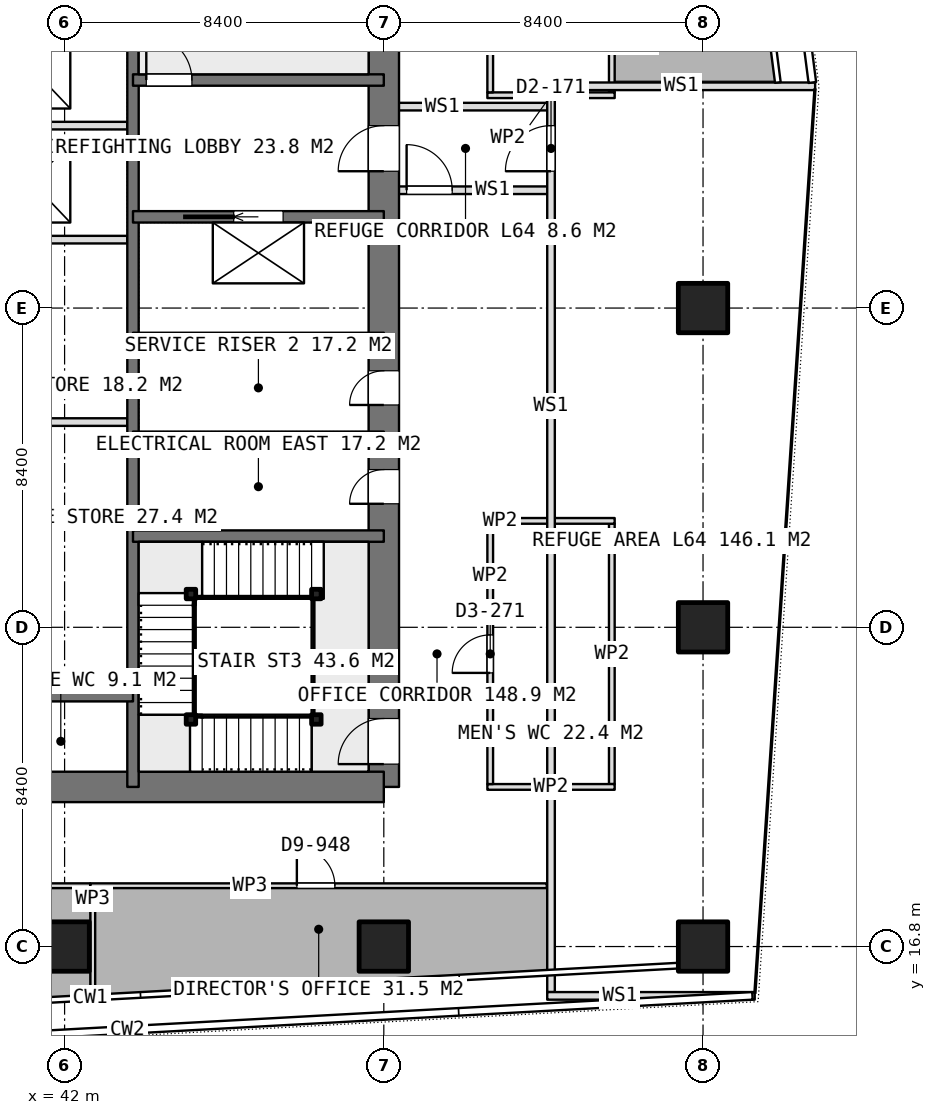
"""IFC4 building model, lengths in metres.
Left out: names, types, materials, properties, quantities, classifications, styles, units other than length and angle.
Written with IfcOpenShell. Run it as: python <this file> out.ifc"""

import sys

from ifc_helpers import new_model, si_unit, direction, frame, frame_2d, origin, origin_2d, place, context, subcontext, project, spatial, rectangle, extrude, element, fill, save


model = new_model("IFC4")
c1 = context("Model", 3, precision=1e-05, world=origin(), true_north=direction((0.0, 1.0)))
c2 = subcontext(c1, "Body", "Model", "MODEL_VIEW")
j1 = project(units=[si_unit("LENGTHUNIT", "METRE"), si_unit("PLANEANGLEUNIT", "RADIAN")], contexts=[c1])
p1 = place(None, origin())
s1 = spatial("IfcSite", under=j1, at=p1, CompositionType="ELEMENT")
p2 = place(p1, origin())
s2 = spatial("IfcBuilding", under=s1, at=p2, CompositionType="ELEMENT")
p3 = place(p2, frame((0.0, 0.0, 253.85)))
s3 = spatial("IfcBuildingStorey", under=s2, at=p3, CompositionType="ELEMENT", Elevation=253.85)
p4 = place(p3, frame((40.0, 21.0, 0.0), z_axis=(0.0, 0.0, 1.0), x_axis=(1.0, 0.0, 0.0)))
e1 = element("IfcWall", 1, at=p4, inside=s3, PredefinedType="SHEAR", context=c2, shape_type="SweptSolid", body=[
    extrude(rectangle(XDim=10.4, YDim=0.8, at=frame_2d((5.2, 0.0))), origin(), (0.0, 0.0, 1.0), 3.75),
])
p5 = place(p3, frame((50.4, 21.0, 0.0), z_axis=(0.0, 0.0, 1.0), x_axis=(0.0, 1.0, 0.0)))
e2 = element("IfcWall", 2, at=p5, inside=s3, PredefinedType="SHEAR", context=c2, shape_type="SweptSolid", body=[
    extrude(rectangle(XDim=25.2, YDim=0.8, at=frame_2d((12.6, 0.0))), origin(), (0.0, 0.0, 1.0), 3.75),
])
p6 = place(p5, frame((16.2, 0.0, 0.0)))
e3 = element("IfcOpeningElement", 3, at=p6, cuts=e2, PredefinedType="OPENING", context=c2, shape_type="SweptSolid", body=[
    extrude(rectangle(XDim=1.2, YDim=2.1, at=frame_2d((0.6, 1.05))), frame((0.0, 0.41, 0.0), z_axis=(0.0, -1.0, 0.0), x_axis=(1.0, 0.0, 0.0)), (0.0, 0.0, 1.0), 0.82),
])
p7 = place(p5, frame((10.05, 0.0, 0.0)))
e4 = element("IfcOpeningElement", 4, at=p7, cuts=e2, PredefinedType="OPENING", context=c2, shape_type="SweptSolid", body=[
    extrude(rectangle(XDim=0.9, YDim=2.1, at=frame_2d((0.45, 1.05))), frame((0.0, 0.41, 0.0), z_axis=(0.0, -1.0, 0.0), x_axis=(1.0, 0.0, 0.0)), (0.0, 0.0, 1.0), 0.82),
])
p8 = place(p5, frame((7.45, 0.0, 0.0)))
e5 = element("IfcOpeningElement", 5, at=p8, cuts=e2, PredefinedType="OPENING", context=c2, shape_type="SweptSolid", body=[
    extrude(rectangle(XDim=0.9, YDim=2.1, at=frame_2d((0.45, 1.05))), frame((0.0, 0.41, 0.0), z_axis=(0.0, -1.0, 0.0), x_axis=(1.0, 0.0, 0.0)), (0.0, 0.0, 1.0), 0.82),
])
p9 = place(p5, frame((0.6, 0.0, 0.0)))
e6 = element("IfcOpeningElement", 6, at=p9, cuts=e2, PredefinedType="OPENING", context=c2, shape_type="SweptSolid", body=[
    extrude(rectangle(XDim=1.2, YDim=2.1, at=frame_2d((0.6, 1.05))), frame((0.0, 0.41, 0.0), z_axis=(0.0, -1.0, 0.0), x_axis=(1.0, 0.0, 0.0)), (0.0, 0.0, 1.0), 0.82),
])
p10 = place(p3, frame((43.8, 21.0, 0.0), z_axis=(0.0, 0.0, 1.0), x_axis=(0.0, 1.0, 0.0)))
e7 = element("IfcWall", 7, at=p10, inside=s3, PredefinedType="SHEAR", context=c2, shape_type="SweptSolid", body=[
    extrude(rectangle(XDim=25.2, YDim=0.3, at=frame_2d((12.6, 0.0))), origin(), (0.0, 0.0, 1.0), 3.75),
])
p11 = place(p3, frame((40.0, 23.4, 0.0), z_axis=(0.0, 0.0, 1.0), x_axis=(1.0, 0.0, 0.0)))
e8 = element("IfcWall", 8, at=p11, inside=s3, PredefinedType="SHEAR", context=c2, shape_type="SweptSolid", body=[
    extrude(rectangle(XDim=3.8, YDim=0.3, at=frame_2d((1.9, 0.0))), origin(), (0.0, 0.0, 1.0), 3.75),
])
for number, where, z_axis, x_axis in (
    (9, (43.8, 27.6, 0.0), (0.0, 0.0, 1.0), (1.0, 0.0, 0.0)),
    (10, (43.8, 30.2, 0.0), (0.0, 0.0, 1.0), (1.0, 0.0, 0.0)),
    (11, (43.8, 32.8, 0.0), (0.0, 0.0, 1.0), (1.0, 0.0, 0.0)),
):
    element("IfcWall", number, at=place(p3, frame(where, z_axis=z_axis, x_axis=x_axis)), inside=s3, PredefinedType="SHEAR", context=c2, shape_type="SweptSolid", body=[
        extrude(rectangle(XDim=6.6, YDim=0.3, at=frame_2d((3.3, 0.0))), origin(), (0.0, 0.0, 1.0), 3.75),
    ])
p12 = place(p3, frame((43.8, 36.0, 0.0), z_axis=(0.0, 0.0, 1.0), x_axis=(1.0, 0.0, 0.0)))
e12 = element("IfcWall", 12, at=p12, inside=s3, PredefinedType="SHEAR", context=c2, shape_type="SweptSolid", body=[
    extrude(rectangle(XDim=6.6, YDim=0.3, at=frame_2d((3.3, 0.0))), origin(), (0.0, 0.0, 1.0), 3.75),
])
p13 = place(p12, frame((2.65, 0.0, 0.0)))
e13 = element("IfcOpeningElement", 13, at=p13, cuts=e12, PredefinedType="OPENING", context=c2, shape_type="SweptSolid", body=[
    extrude(rectangle(XDim=1.3, YDim=2.1, at=frame_2d((0.65, 1.05))), frame((0.0, 0.16, 0.0), z_axis=(0.0, -1.0, 0.0), x_axis=(1.0, 0.0, 0.0)), (0.0, 0.0, 1.0), 0.32),
])
p14 = place(p3, frame((43.8, 39.6, 0.0), z_axis=(0.0, 0.0, 1.0), x_axis=(1.0, 0.0, 0.0)))
e14 = element("IfcWall", 14, at=p14, inside=s3, PredefinedType="SHEAR", context=c2, shape_type="SweptSolid", body=[
    extrude(rectangle(XDim=6.6, YDim=0.3, at=frame_2d((3.3, 0.0))), origin(), (0.0, 0.0, 1.0), 3.75),
])
p15 = place(p14, frame((0.35, 0.0, 0.0)))
e15 = element("IfcOpeningElement", 15, at=p15, cuts=e14, PredefinedType="OPENING", context=c2, shape_type="SweptSolid", body=[
    extrude(rectangle(XDim=1.2, YDim=2.1, at=frame_2d((0.6, 1.05))), frame((0.0, 0.16, 0.0), z_axis=(0.0, -1.0, 0.0), x_axis=(1.0, 0.0, 0.0)), (0.0, 0.0, 1.0), 0.32),
])
for number, where, z_axis, x_axis in (
    (16, (42.0, 16.8, 0.0), (0.0, 0.0, 1.0), (1.0, 0.0, 0.0)),
    (17, (50.4, 16.8, 0.0), (0.0, 0.0, 1.0), (1.0, 0.0, 0.0)),
    (18, (58.8, 16.8, 0.0), (0.0, 0.0, 1.0), (1.0, 0.0, 0.0)),
    (19, (58.8, 25.2, 0.0), (0.0, 0.0, 1.0), (1.0, 0.0, 0.0)),
    (20, (58.8, 33.6, 0.0), (0.0, 0.0, 1.0), (1.0, 0.0, 0.0)),
):
    element("IfcColumn", number, at=place(p3, frame(where, z_axis=z_axis, x_axis=x_axis)), inside=s3, PredefinedType="COLUMN", context=c2, shape_type="SweptSolid", body=[
        extrude(rectangle(XDim=1.3, YDim=1.3, at=origin_2d()), origin(), (0.0, 0.0, 1.0), 3.75),
    ])
for number, where, z_axis, x_axis in (
    (21, (40.5, 35.4, 0.0), (0.0, 0.0, 1.0), (1.0, 0.0, 0.0)),
    (22, (40.5, 38.4, 0.0), (0.0, 0.0, 1.0), (1.0, 0.0, 0.0)),
    (23, (40.5, 30.6, 0.0), (0.0, 0.0, 1.0), (1.0, 0.0, 0.0)),
):
    element("IfcWall", number, at=place(p3, frame(where, z_axis=z_axis, x_axis=x_axis)), inside=s3, PredefinedType="PARTITIONING", context=c2, shape_type="SweptSolid", body=[
        extrude(rectangle(XDim=3.15, YDim=0.2, at=frame_2d((1.575, 0.0))), origin(), (0.0, 0.0, 1.0), 3.5),
    ])
p16 = place(p3, frame((53.125, 39.2, 0.0), z_axis=(0.0, 0.0, 1.0), x_axis=(1.0, 0.0, 0.0)))
e24 = element("IfcWall", 24, at=p16, inside=s3, PredefinedType="PARTITIONING", context=c2, shape_type="SweptSolid", body=[
    extrude(rectangle(XDim=3.35, YDim=0.15, at=frame_2d((1.675, 0.0))), origin(), (0.0, 0.0, 1.0), 3.5),
])
p17 = place(p3, frame((53.2, 39.275, 0.0), z_axis=(0.0, 0.0, 1.0), x_axis=(0.0, 1.0, 0.0)))
e25 = element("IfcWall", 25, at=p17, inside=s3, PredefinedType="PARTITIONING", context=c2, shape_type="SweptSolid", body=[
    extrude(rectangle(XDim=6.85, YDim=0.15, at=frame_2d((3.425, 0.0))), origin(), (0.0, 0.0, 1.0), 3.5),
])
p18 = place(p17, frame((2.925, 0.0, 0.0)))
e26 = element("IfcOpeningElement", 26, at=p18, cuts=e25, PredefinedType="OPENING", context=c2, shape_type="SweptSolid", body=[
    extrude(rectangle(XDim=1.0, YDim=2.1, at=frame_2d((0.5, 1.05))), frame((0.0, 0.085, 0.0), z_axis=(0.0, -1.0, 0.0), x_axis=(1.0, 0.0, 0.0)), (0.0, 0.0, 1.0), 0.17),
])
p19 = place(p3, frame((56.4, 39.275, 0.0), z_axis=(0.0, 0.0, 1.0), x_axis=(0.0, 1.0, 0.0)))
e27 = element("IfcWall", 27, at=p19, inside=s3, PredefinedType="PARTITIONING", context=c2, shape_type="SweptSolid", body=[
    extrude(rectangle(XDim=6.85, YDim=0.15, at=frame_2d((3.425, 0.0))), origin(), (0.0, 0.0, 1.0), 3.5),
])
for number, where, z_axis, x_axis in (
    (28, (53.125, 21.0, 0.0), (0.0, 0.0, 1.0), (1.0, 0.0, 0.0)),
    (29, (53.125, 28.0, 0.0), (0.0, 0.0, 1.0), (1.0, 0.0, 0.0)),
):
    element("IfcWall", number, at=place(p3, frame(where, z_axis=z_axis, x_axis=x_axis)), inside=s3, PredefinedType="PARTITIONING", context=c2, shape_type="SweptSolid", body=[
        extrude(rectangle(XDim=3.35, YDim=0.15, at=frame_2d((1.675, 0.0))), origin(), (0.0, 0.0, 1.0), 3.5),
    ])
p20 = place(p3, frame((53.2, 21.075, 0.0), z_axis=(0.0, 0.0, 1.0), x_axis=(0.0, 1.0, 0.0)))
e30 = element("IfcWall", 30, at=p20, inside=s3, PredefinedType="PARTITIONING", context=c2, shape_type="SweptSolid", body=[
    extrude(rectangle(XDim=6.85, YDim=0.15, at=frame_2d((3.425, 0.0))), origin(), (0.0, 0.0, 1.0), 3.5),
])
p21 = place(p20, frame((2.925, 0.0, 0.0)))
e31 = element("IfcOpeningElement", 31, at=p21, cuts=e30, PredefinedType="OPENING", context=c2, shape_type="SweptSolid", body=[
    extrude(rectangle(XDim=1.0, YDim=2.1, at=frame_2d((0.5, 1.05))), frame((0.0, 0.085, 0.0), z_axis=(0.0, -1.0, 0.0), x_axis=(1.0, 0.0, 0.0)), (0.0, 0.0, 1.0), 0.17),
])
p22 = place(p3, frame((56.4, 21.075, 0.0), z_axis=(0.0, 0.0, 1.0), x_axis=(0.0, 1.0, 0.0)))
e32 = element("IfcWall", 32, at=p22, inside=s3, PredefinedType="PARTITIONING", context=c2, shape_type="SweptSolid", body=[
    extrude(rectangle(XDim=6.85, YDim=0.15, at=frame_2d((3.425, 0.0))), origin(), (0.0, 0.0, 1.0), 3.5),
])
p23 = place(p3, frame((42.742, 15.538, 0.0), z_axis=(0.0, 0.0, 1.0), x_axis=(0.0, 1.0, 0.0)))
e33 = element("IfcWall", 33, at=p23, inside=s3, PredefinedType="PARTITIONING", context=c2, shape_type="SweptSolid", body=[
    extrude(rectangle(XDim=2.799, YDim=0.125, at=frame_2d((1.399, 0.0))), origin(), (0.0, 0.0, 1.0), 3.5),
])
p24 = place(p3, frame((42.674, 18.4, 0.0), z_axis=(0.0, 0.0, 1.0), x_axis=(1.0, 0.0, 0.0)))
e34 = element("IfcWall", 34, at=p24, inside=s3, PredefinedType="PARTITIONING", context=c2, shape_type="SweptSolid", body=[
    extrude(rectangle(XDim=12.015, YDim=0.125, at=frame_2d((6.007, 0.0))), origin(), (0.0, 0.0, 1.0), 3.5),
])
p25 = place(p24, frame((5.438, 0.0, 0.0)))
e35 = element("IfcOpeningElement", 35, at=p25, cuts=e34, PredefinedType="OPENING", context=c2, shape_type="SweptSolid", body=[
    extrude(rectangle(XDim=1.0, YDim=2.1, at=frame_2d((0.5, 1.05))), frame((0.0, 0.073, 0.0), z_axis=(0.0, -1.0, 0.0), x_axis=(1.0, 0.0, 0.0)), (0.0, 0.0, 1.0), 0.145),
])
p26 = place(p3, frame((34.505, 18.4, 0.0), z_axis=(0.0, 0.0, 1.0), x_axis=(1.0, 0.0, 0.0)))
e36 = element("IfcWall", 36, at=p26, inside=s3, PredefinedType="PARTITIONING", context=c2, shape_type="SweptSolid", body=[
    extrude(rectangle(XDim=8.168, YDim=0.125, at=frame_2d((4.084, 0.0))), origin(), (0.0, 0.0, 1.0), 3.5),
])
p27 = place(p26, frame((3.584, 0.0, 0.0)))
e37 = element("IfcOpeningElement", 37, at=p27, cuts=e36, PredefinedType="OPENING", context=c2, shape_type="SweptSolid", body=[
    extrude(rectangle(XDim=1.0, YDim=2.1, at=frame_2d((0.5, 1.05))), frame((0.0, 0.073, 0.0), z_axis=(0.0, -1.0, 0.0), x_axis=(1.0, 0.0, 0.0)), (0.0, 0.0, 1.0), 0.145),
])
for number, where, z_axis, x_axis in (
    (38, (48.625, 22.775, 0.0), (0.0, 0.0, 1.0), (1.0, 0.0, 0.0)),
    (39, (45.325, 22.775, 0.0), (0.0, 0.0, 1.0), (1.0, 0.0, 0.0)),
    (40, (45.325, 26.075, 0.0), (0.0, 0.0, 1.0), (1.0, 0.0, 0.0)),
    (41, (48.625, 26.075, 0.0), (0.0, 0.0, 1.0), (1.0, 0.0, 0.0)),
):
    element("IfcColumn", number, at=place(p3, frame(where, z_axis=z_axis, x_axis=x_axis)), inside=s3, PredefinedType="COLUMN", context=c2, shape_type="SweptSolid", body=[
        extrude(rectangle(XDim=0.25, YDim=0.25, at=origin_2d()), origin(), (0.0, 0.0, 1.0), 3.75),
    ])
p28 = place(p3, frame((54.8, 15.602, 0.0), z_axis=(0.0, 0.0, 1.0), x_axis=(0.0, 1.0, 0.0)))
e42 = element("IfcWall", 42, at=p28, inside=s3, PredefinedType="PARTITIONING", context=c2, shape_type="SweptSolid", body=[
    extrude(rectangle(XDim=23.733, YDim=0.2, at=frame_2d((11.866, 0.0))), origin(), (0.0, 0.0, 1.0), 3.5),
])
p29 = place(p28, frame((21.598, 0.0, 0.0)))
e43 = element("IfcOpeningElement", 43, at=p29, cuts=e42, PredefinedType="OPENING", context=c2, shape_type="SweptSolid", body=[
    extrude(rectangle(XDim=1.2, YDim=2.1, at=frame_2d((0.6, 1.05))), frame((0.0, 0.11, 0.0), z_axis=(0.0, -1.0, 0.0), x_axis=(1.0, 0.0, 0.0)), (0.0, 0.0, 1.0), 0.22),
])
p30 = place(p3, frame((54.7, 15.502, 0.0), z_axis=(0.0, 0.0, 1.0), x_axis=(1.0, 0.0, 0.0)))
e44 = element("IfcWall", 44, at=p30, inside=s3, PredefinedType="PARTITIONING", context=c2, shape_type="SweptSolid", body=[
    extrude(rectangle(XDim=5.46, YDim=0.2, at=frame_2d((2.73, 0.0))), origin(), (0.0, 0.0, 1.0), 3.5),
])
p31 = place(p3, frame((54.7, 39.435, 0.0), z_axis=(0.0, 0.0, 1.0), x_axis=(1.0, 0.0, 0.0)))
e45 = element("IfcWall", 45, at=p31, inside=s3, PredefinedType="PARTITIONING", context=c2, shape_type="SweptSolid", body=[
    extrude(rectangle(XDim=7.05, YDim=0.2, at=frame_2d((3.525, 0.0))), origin(), (0.0, 0.0, 1.0), 3.5),
])
p32 = place(p3, frame((50.4, 38.9, 0.0), z_axis=(0.0, 0.0, 1.0), x_axis=(1.0, 0.0, 0.0)))
e46 = element("IfcWall", 46, at=p32, inside=s3, PredefinedType="PARTITIONING", context=c2, shape_type="SweptSolid", body=[
    extrude(rectangle(XDim=4.4, YDim=0.2, at=frame_2d((2.2, 0.0))), origin(), (0.0, 0.0, 1.0), 3.5),
])
p33 = place(p3, frame((50.4, 36.7, 0.0), z_axis=(0.0, 0.0, 1.0), x_axis=(1.0, 0.0, 0.0)))
e47 = element("IfcWall", 47, at=p33, inside=s3, PredefinedType="PARTITIONING", context=c2, shape_type="SweptSolid", body=[
    extrude(rectangle(XDim=4.4, YDim=0.2, at=frame_2d((2.2, 0.0))), origin(), (0.0, 0.0, 1.0), 3.5),
])
p34 = place(p33, frame((0.6, 0.0, 0.0)))
e48 = element("IfcOpeningElement", 48, at=p34, cuts=e47, PredefinedType="OPENING", context=c2, shape_type="SweptSolid", body=[
    extrude(rectangle(XDim=1.2, YDim=2.1, at=frame_2d((0.6, 1.05))), frame((0.0, 0.11, 0.0), z_axis=(0.0, -1.0, 0.0), x_axis=(1.0, 0.0, 0.0)), (0.0, 0.0, 1.0), 0.22),
])
p35 = place(p6, origin())
e49 = element("IfcDoor", 49, at=p35, inside=s3, OperationType="SINGLE_SWING_LEFT", PredefinedType="DOOR", context=c2, shape_type="SweptSolid", body=[
    extrude(rectangle(XDim=1.2, YDim=2.1, at=frame_2d((0.6, 1.05))), frame((0.0, 0.025, 0.0), z_axis=(0.0, -1.0, 0.0), x_axis=(1.0, 0.0, 0.0)), (0.0, 0.0, 1.0), 0.05),
])
fill(e3, e49)
p36 = place(p7, origin())
e50 = element("IfcDoor", 50, at=p36, inside=s3, OperationType="SINGLE_SWING_LEFT", PredefinedType="DOOR", context=c2, shape_type="SweptSolid", body=[
    extrude(rectangle(XDim=0.9, YDim=2.1, at=frame_2d((0.45, 1.05))), frame((0.0, 0.025, 0.0), z_axis=(0.0, -1.0, 0.0), x_axis=(1.0, 0.0, 0.0)), (0.0, 0.0, 1.0), 0.05),
])
fill(e4, e50)
p37 = place(p8, origin())
e51 = element("IfcDoor", 51, at=p37, inside=s3, OperationType="SINGLE_SWING_LEFT", PredefinedType="DOOR", context=c2, shape_type="SweptSolid", body=[
    extrude(rectangle(XDim=0.9, YDim=2.1, at=frame_2d((0.45, 1.05))), frame((0.0, 0.025, 0.0), z_axis=(0.0, -1.0, 0.0), x_axis=(1.0, 0.0, 0.0)), (0.0, 0.0, 1.0), 0.05),
])
fill(e5, e51)
p38 = place(p13, origin())
e52 = element("IfcDoor", 52, at=p38, inside=s3, OperationType="SLIDING_TO_LEFT", PredefinedType="USERDEFINED", context=c2, shape_type="SweptSolid", body=[
    extrude(rectangle(XDim=1.3, YDim=2.1, at=frame_2d((0.65, 1.05))), frame((0.0, 0.025, 0.0), z_axis=(0.0, -1.0, 0.0), x_axis=(1.0, 0.0, 0.0)), (0.0, 0.0, 1.0), 0.05),
])
fill(e13, e52)
p39 = place(p21, origin())
e53 = element("IfcDoor", 53, at=p39, inside=s3, OperationType="SINGLE_SWING_LEFT", PredefinedType="DOOR", context=c2, shape_type="SweptSolid", body=[
    extrude(rectangle(XDim=1.0, YDim=2.1, at=frame_2d((0.5, 1.05))), frame((0.0, 0.025, 0.0), z_axis=(0.0, -1.0, 0.0), x_axis=(1.0, 0.0, 0.0)), (0.0, 0.0, 1.0), 0.05),
])
fill(e31, e53)
p40 = place(p25, origin())
e54 = element("IfcDoor", 54, at=p40, inside=s3, OperationType="SINGLE_SWING_LEFT", PredefinedType="DOOR", context=c2, shape_type="SweptSolid", body=[
    extrude(rectangle(XDim=1.0, YDim=2.1, at=frame_2d((0.5, 1.05))), frame((0.0, 0.025, 0.0), z_axis=(0.0, -1.0, 0.0), x_axis=(1.0, 0.0, 0.0)), (0.0, 0.0, 1.0), 0.05),
])
fill(e35, e54)
p41 = place(p15, origin())
e55 = element("IfcDoor", 55, at=p41, inside=s3, OperationType="SINGLE_SWING_RIGHT", PredefinedType="DOOR", context=c2, shape_type="SweptSolid", body=[
    extrude(rectangle(XDim=1.2, YDim=2.1, at=frame_2d((0.6, 1.05))), frame((0.0, 0.025, 0.0), z_axis=(0.0, -1.0, 0.0), x_axis=(1.0, 0.0, 0.0)), (0.0, 0.0, 1.0), 0.05),
])
fill(e15, e55)
p42 = place(p9, origin())
e56 = element("IfcDoor", 56, at=p42, inside=s3, OperationType="SINGLE_SWING_RIGHT", PredefinedType="DOOR", context=c2, shape_type="SweptSolid", body=[
    extrude(rectangle(XDim=1.2, YDim=2.1, at=frame_2d((0.6, 1.05))), frame((0.0, 0.025, 0.0), z_axis=(0.0, -1.0, 0.0), x_axis=(1.0, 0.0, 0.0)), (0.0, 0.0, 1.0), 0.05),
])
fill(e6, e56)
p43 = place(p29, origin())
e57 = element("IfcDoor", 57, at=p43, inside=s3, OperationType="SINGLE_SWING_LEFT", PredefinedType="DOOR", context=c2, shape_type="SweptSolid", body=[
    extrude(rectangle(XDim=1.2, YDim=2.1, at=frame_2d((0.6, 1.05))), frame((0.0, 0.025, 0.0), z_axis=(0.0, -1.0, 0.0), x_axis=(1.0, 0.0, 0.0)), (0.0, 0.0, 1.0), 0.05),
])
fill(e43, e57)
p44 = place(p34, origin())
e58 = element("IfcDoor", 58, at=p44, inside=s3, OperationType="SINGLE_SWING_LEFT", PredefinedType="DOOR", context=c2, shape_type="SweptSolid", body=[
    extrude(rectangle(XDim=1.2, YDim=2.1, at=frame_2d((0.6, 1.05))), frame((0.0, 0.025, 0.0), z_axis=(0.0, -1.0, 0.0), x_axis=(1.0, 0.0, 0.0)), (0.0, 0.0, 1.0), 0.05),
])
fill(e48, e58)
save(model, sys.argv[1])
